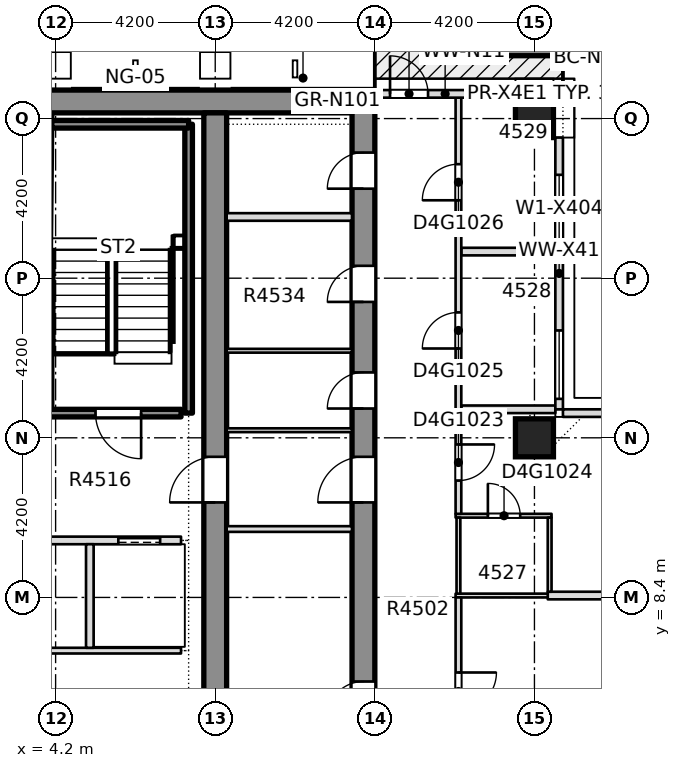
"""IFC4 building model, lengths in metres.
Left out: names, types, materials, properties, quantities, classifications, styles, units other than length and angle.
Written with IfcOpenShell. Run it as: python <this file> out.ifc"""

import sys

from ifc_helpers import new_model, si_unit, direction, frame, frame_2d, origin, origin_2d, place, context, subcontext, project, spatial, rectangle, extrude, element, fill, save


model = new_model("IFC4")
c1 = context("Model", 3, precision=1e-05, world=origin(), true_north=direction((0.0, 1.0)))
c2 = subcontext(c1, "Body", "Model", "MODEL_VIEW")
j1 = project(units=[si_unit("LENGTHUNIT", "METRE"), si_unit("PLANEANGLEUNIT", "RADIAN")], contexts=[c1])
p1 = place(None, origin())
s1 = spatial("IfcSite", under=j1, at=p1, CompositionType="ELEMENT")
p2 = place(p1, origin())
s2 = spatial("IfcBuilding", under=s1, at=p2, CompositionType="ELEMENT")
p3 = place(p2, frame((0.0, 0.0, 175.55)))
s3 = spatial("IfcBuildingStorey", under=s2, at=p3, CompositionType="ELEMENT", Elevation=175.55)
p4 = place(p3, frame((12.3, -8.4, -0.4), z_axis=(0.0, 0.0, 1.0), x_axis=(0.0, 1.0, 0.0)))
e1 = element("IfcWall", 1, at=p4, inside=s3, PredefinedType="SHEAR", context=c2, shape_type="SweptSolid", body=[
    extrude(rectangle(XDim=30.15, YDim=0.6, at=frame_2d((15.075, 0.0))), origin(), (0.0, 0.0, 1.0), 3.45),
])
p5 = place(p4, frame((4.788, 0.0, 0.4)))
e2 = element("IfcOpeningElement", 2, at=p5, cuts=e1, PredefinedType="OPENING", context=c2, shape_type="SweptSolid", body=[
    extrude(rectangle(XDim=0.95, YDim=2.1, at=frame_2d((0.475, 1.05))), frame((0.0, 0.31, 0.0), z_axis=(0.0, -1.0, 0.0), x_axis=(1.0, 0.0, 0.0)), (0.0, 0.0, 1.0), 0.62),
])
p6 = place(p4, frame((13.638, 0.0, 0.4)))
e3 = element("IfcOpeningElement", 3, at=p6, cuts=e1, PredefinedType="OPENING", context=c2, shape_type="SweptSolid", body=[
    extrude(rectangle(XDim=0.95, YDim=2.1, at=frame_2d((0.475, 1.05))), frame((0.0, 0.31, 0.0), z_axis=(0.0, -1.0, 0.0), x_axis=(1.0, 0.0, 0.0)), (0.0, 0.0, 1.0), 0.62),
])
p7 = place(p4, frame((21.771, 0.0, 0.4)))
e4 = element("IfcOpeningElement", 4, at=p7, cuts=e1, PredefinedType="OPENING", context=c2, shape_type="SweptSolid", body=[
    extrude(rectangle(XDim=0.95, YDim=2.1, at=frame_2d((0.475, 1.05))), frame((0.0, 0.31, 0.0), z_axis=(0.0, -1.0, 0.0), x_axis=(1.0, 0.0, 0.0)), (0.0, 0.0, 1.0), 0.62),
])
p8 = place(p4, frame((24.576, 0.0, 0.4)))
e5 = element("IfcOpeningElement", 5, at=p8, cuts=e1, PredefinedType="OPENING", context=c2, shape_type="SweptSolid", body=[
    extrude(rectangle(XDim=0.95, YDim=2.1, at=frame_2d((0.475, 1.05))), frame((0.0, 0.31, 0.0), z_axis=(0.0, -1.0, 0.0), x_axis=(1.0, 0.0, 0.0)), (0.0, 0.0, 1.0), 0.62),
])
p9 = place(p4, frame((27.555, 0.0, 0.4)))
e6 = element("IfcOpeningElement", 6, at=p9, cuts=e1, PredefinedType="OPENING", context=c2, shape_type="SweptSolid", body=[
    extrude(rectangle(XDim=0.95, YDim=2.1, at=frame_2d((0.475, 1.05))), frame((0.0, 0.31, 0.0), z_axis=(0.0, -1.0, 0.0), x_axis=(1.0, 0.0, 0.0)), (0.0, 0.0, 1.0), 0.62),
])
p10 = place(p4, frame((19.3, 0.0, 0.4)))
e7 = element("IfcOpeningElement", 7, at=p10, cuts=e1, PredefinedType="OPENING", context=c2, shape_type="SweptSolid", body=[
    extrude(rectangle(XDim=1.2, YDim=2.1, at=frame_2d((0.6, 1.05))), frame((0.0, 0.31, 0.0), z_axis=(0.0, -1.0, 0.0), x_axis=(1.0, 0.0, 0.0)), (0.0, 0.0, 1.0), 0.62),
])
p11 = place(p3, frame((-12.0, 21.45, -0.4), z_axis=(0.0, 0.0, 1.0), x_axis=(1.0, 0.0, 0.0)))
e8 = element("IfcWall", 8, at=p11, inside=s3, PredefinedType="SHEAR", context=c2, shape_type="SweptSolid", body=[
    extrude(rectangle(XDim=24.0, YDim=0.6, at=frame_2d((12.0, 0.0))), origin(), (0.0, 0.0, 1.0), 3.45),
])
p12 = place(p3, frame((8.4, -7.8, -0.4), z_axis=(0.0, 0.0, 1.0), x_axis=(0.0, 1.0, 0.0)))
e9 = element("IfcWall", 9, at=p12, inside=s3, PredefinedType="SHEAR", context=c2, shape_type="SweptSolid", body=[
    extrude(rectangle(XDim=28.95, YDim=0.6, at=frame_2d((14.475, 0.0))), origin(), (0.0, 0.0, 1.0), 3.45),
])
p13 = place(p12, frame((18.7, 0.0, 0.4)))
e10 = element("IfcOpeningElement", 10, at=p13, cuts=e9, PredefinedType="OPENING", context=c2, shape_type="SweptSolid", body=[
    extrude(rectangle(XDim=1.2, YDim=2.1, at=frame_2d((0.6, 1.05))), frame((0.0, 0.31, 0.0), z_axis=(0.0, -1.0, 0.0), x_axis=(1.0, 0.0, 0.0)), (0.0, 0.0, 1.0), 0.62),
])
for number, where, z_axis, x_axis in (
    (11, (16.8, 12.6, -0.4), (0.0, 0.0, 1.0), (1.0, 0.0, 0.0)),
    (12, (16.8, 21.0, -0.4), (0.0, 0.0, 1.0), (1.0, 0.0, 0.0)),
):
    element("IfcColumn", number, at=place(p3, frame(where, z_axis=z_axis, x_axis=x_axis)), inside=s3, PredefinedType="COLUMN", context=c2, shape_type="SweptSolid", body=[
        extrude(rectangle(XDim=1.0, YDim=1.0, at=origin_2d()), origin(), (0.0, 0.0, 1.0), 3.45),
    ])
p14 = place(p3, frame((14.725, 8.45, 0.0), z_axis=(0.0, 0.0, 1.0), x_axis=(1.0, 0.0, 0.0)))
e13 = element("IfcWall", 13, at=p14, inside=s3, PredefinedType="PARTITIONING", context=c2, shape_type="SweptSolid", body=[
    extrude(rectangle(XDim=2.525, YDim=0.1, at=frame_2d((1.262, 0.0))), origin(), (0.0, 0.0, 1.0), 3.05),
])
p15 = place(p3, frame((17.15, 8.45, 0.0), z_axis=(0.0, 0.0, 1.0), x_axis=(1.0, 0.0, 0.0)))
e14 = element("IfcWall", 14, at=p15, inside=s3, PredefinedType="PARTITIONING", context=c2, shape_type="SweptSolid", body=[
    extrude(rectangle(XDim=8.6, YDim=0.2, at=frame_2d((4.3, 0.0))), origin(), (0.0, 0.0, 1.0), 3.05),
])
p16 = place(p3, frame((14.725, 10.55, 0.0), z_axis=(0.0, 0.0, 1.0), x_axis=(1.0, 0.0, 0.0)))
e15 = element("IfcWall", 15, at=p16, inside=s3, PredefinedType="PARTITIONING", context=c2, shape_type="SweptSolid", body=[
    extrude(rectangle(XDim=2.525, YDim=0.1, at=frame_2d((1.262, 0.0))), origin(), (0.0, 0.0, 1.0), 3.05),
])
p17 = place(p16, frame((0.85, 0.0, 0.0)))
e16 = element("IfcOpeningElement", 16, at=p17, cuts=e15, PredefinedType="OPENING", context=c2, shape_type="SweptSolid", body=[
    extrude(rectangle(XDim=0.85, YDim=2.1, at=frame_2d((0.425, 1.05))), frame((0.0, 0.06, 0.0), z_axis=(0.0, -1.0, 0.0), x_axis=(1.0, 0.0, 0.0)), (0.0, 0.0, 1.0), 0.12),
])
for number, where, z_axis, x_axis in (
    (17, (14.875, 13.35, 0.0), (0.0, 0.0, 1.0), (1.0, 0.0, 0.0)),
    (18, (14.875, 17.5, 0.0), (0.0, 0.0, 1.0), (1.0, 0.0, 0.0)),
):
    element("IfcWall", number, at=place(p3, frame(where, z_axis=z_axis, x_axis=x_axis)), inside=s3, PredefinedType="PARTITIONING", context=c2, shape_type="SweptSolid", body=[
        extrude(rectangle(XDim=2.475, YDim=0.2, at=frame_2d((1.238, 0.0))), origin(), (0.0, 0.0, 1.0), 3.05),
    ])
p18 = place(p3, frame((14.8, -10.525, 0.0), z_axis=(0.0, 0.0, 1.0), x_axis=(0.0, 1.0, 0.0)))
e19 = element("IfcWall", 19, at=p18, inside=s3, PredefinedType="PARTITIONING", context=c2, shape_type="SweptSolid", body=[
    extrude(rectangle(XDim=18.925, YDim=0.15, at=frame_2d((9.462, 0.0))), origin(), (0.0, 0.0, 1.0), 3.05),
])
p19 = place(p18, frame((0.925, 0.0, 0.0)))
e20 = element("IfcOpeningElement", 20, at=p19, cuts=e19, PredefinedType="OPENING", context=c2, shape_type="SweptSolid", body=[
    extrude(rectangle(XDim=1.0, YDim=2.1, at=frame_2d((0.5, 1.05))), frame((0.0, 0.085, 0.0), z_axis=(0.0, -1.0, 0.0), x_axis=(1.0, 0.0, 0.0)), (0.0, 0.0, 1.0), 0.17),
])
p20 = place(p18, frame((15.95, 0.0, 0.0)))
e21 = element("IfcOpeningElement", 21, at=p20, cuts=e19, PredefinedType="OPENING", context=c2, shape_type="SweptSolid", body=[
    extrude(rectangle(XDim=1.0, YDim=2.1, at=frame_2d((0.5, 1.05))), frame((0.0, 0.085, 0.0), z_axis=(0.0, -1.0, 0.0), x_axis=(1.0, 0.0, 0.0)), (0.0, 0.0, 1.0), 0.17),
])
p21 = place(p18, frame((9.975, 0.0, 0.0)))
e22 = element("IfcOpeningElement", 22, at=p21, cuts=e19, PredefinedType="OPENING", context=c2, shape_type="SweptSolid", body=[
    extrude(rectangle(XDim=1.1, YDim=2.1, at=frame_2d((0.55, 1.05))), frame((0.0, 0.085, 0.0), z_axis=(0.0, -1.0, 0.0), x_axis=(1.0, 0.0, 0.0)), (0.0, 0.0, 1.0), 0.17),
])
p22 = place(p18, frame((4.825, 0.0, 0.0)))
e23 = element("IfcOpeningElement", 23, at=p22, cuts=e19, PredefinedType="OPENING", context=c2, shape_type="SweptSolid", body=[
    extrude(rectangle(XDim=1.0, YDim=2.1, at=frame_2d((0.5, 1.05))), frame((0.0, 0.085, 0.0), z_axis=(0.0, -1.0, 0.0), x_axis=(1.0, 0.0, 0.0)), (0.0, 0.0, 1.0), 0.17),
])
p23 = place(p3, frame((14.8, 8.5, 0.0), z_axis=(0.0, 0.0, 1.0), x_axis=(0.0, 1.0, 0.0)))
e24 = element("IfcWall", 24, at=p23, inside=s3, PredefinedType="PARTITIONING", context=c2, shape_type="SweptSolid", body=[
    extrude(rectangle(XDim=2.0, YDim=0.1, at=frame_2d((1.0, 0.0))), origin(), (0.0, 0.0, 1.0), 3.05),
])
p24 = place(p3, frame((14.8, 10.6, 0.0), z_axis=(0.0, 0.0, 1.0), x_axis=(0.0, 1.0, 0.0)))
e25 = element("IfcWall", 25, at=p24, inside=s3, PredefinedType="PARTITIONING", context=c2, shape_type="SweptSolid", body=[
    extrude(rectangle(XDim=10.95, YDim=0.15, at=frame_2d((5.475, 0.0))), origin(), (0.0, 0.0, 1.0), 3.05),
])
p25 = place(p24, frame((0.875, 0.0, 0.0)))
e26 = element("IfcOpeningElement", 26, at=p25, cuts=e25, PredefinedType="OPENING", context=c2, shape_type="SweptSolid", body=[
    extrude(rectangle(XDim=0.95, YDim=2.1, at=frame_2d((0.475, 1.05))), frame((0.0, 0.085, 0.0), z_axis=(0.0, -1.0, 0.0), x_axis=(1.0, 0.0, 0.0)), (0.0, 0.0, 1.0), 0.17),
])
p26 = place(p24, frame((4.35, 0.0, 0.0)))
e27 = element("IfcOpeningElement", 27, at=p26, cuts=e25, PredefinedType="OPENING", context=c2, shape_type="SweptSolid", body=[
    extrude(rectangle(XDim=0.95, YDim=2.1, at=frame_2d((0.475, 1.05))), frame((0.0, 0.085, 0.0), z_axis=(0.0, -1.0, 0.0), x_axis=(1.0, 0.0, 0.0)), (0.0, 0.0, 1.0), 0.17),
])
p27 = place(p24, frame((8.25, 0.0, 0.0)))
e28 = element("IfcOpeningElement", 28, at=p27, cuts=e25, PredefinedType="OPENING", context=c2, shape_type="SweptSolid", body=[
    extrude(rectangle(XDim=0.95, YDim=2.1, at=frame_2d((0.475, 1.05))), frame((0.0, 0.085, 0.0), z_axis=(0.0, -1.0, 0.0), x_axis=(1.0, 0.0, 0.0)), (0.0, 0.0, 1.0), 0.17),
])
p28 = place(p3, frame((17.2, 8.55, 0.0), z_axis=(0.0, 0.0, 1.0), x_axis=(0.0, 1.0, 0.0)))
e29 = element("IfcWall", 29, at=p28, inside=s3, PredefinedType="PARTITIONING", context=c2, shape_type="SweptSolid", body=[
    extrude(rectangle(XDim=1.95, YDim=0.1, at=frame_2d((0.975, 0.0))), origin(), (0.0, 0.0, 1.0), 3.05),
])
p29 = place(p3, frame((24.7, 13.25, 0.0), z_axis=(0.0, 0.0, 1.0), x_axis=(-1.0, 0.0, 0.0)))
e30 = element("IfcWall", 30, at=p29, inside=s3, PredefinedType="STANDARD", context=c2, shape_type="SweptSolid", body=[
    extrude(rectangle(XDim=7.15, YDim=0.2, at=frame_2d((3.575, 0.0))), origin(), (0.0, 0.0, 1.0), 3.05),
])
p30 = place(p3, frame((17.45, 13.35, 0.0), z_axis=(0.0, 0.0, 1.0), x_axis=(0.0, 1.0, 0.0)))
e31 = element("IfcWall", 31, at=p30, inside=s3, PredefinedType="STANDARD", context=c2, shape_type="SweptSolid", body=[
    extrude(rectangle(XDim=7.15, YDim=0.2, at=frame_2d((3.575, 0.0))), origin(), (0.0, 0.0, 1.0), 3.05),
])
p31 = place(p30, frame((0.275, 0.0, 0.2)))
e32 = element("IfcOpeningElement", 32, at=p31, cuts=e31, PredefinedType="OPENING", context=c2, shape_type="SweptSolid", body=[
    extrude(rectangle(XDim=1.8, YDim=2.65, at=frame_2d((0.9, 1.325))), frame((0.0, 0.11, 0.0), z_axis=(0.0, -1.0, 0.0), x_axis=(1.0, 0.0, 0.0)), (0.0, 0.0, 1.0), 0.22),
])
p32 = place(p30, frame((4.37, 0.0, 0.2)))
e33 = element("IfcOpeningElement", 33, at=p32, cuts=e31, PredefinedType="OPENING", context=c2, shape_type="SweptSolid", body=[
    extrude(rectangle(XDim=1.8, YDim=2.65, at=frame_2d((0.9, 1.325))), frame((0.0, 0.11, 0.0), z_axis=(0.0, -1.0, 0.0), x_axis=(1.0, 0.0, 0.0)), (0.0, 0.0, 1.0), 0.22),
])
p33 = place(p3, frame((16.3, 21.65, 0.0), z_axis=(0.0, 0.0, 1.0), x_axis=(-1.0, 0.0, 0.0)))
e34 = element("IfcWall", 34, at=p33, inside=s3, PredefinedType="STANDARD", context=c2, shape_type="SweptSolid", body=[
    extrude(rectangle(XDim=3.7, YDim=0.2, at=frame_2d((1.85, 0.0))), origin(), (0.0, 0.0, 1.0), 3.05),
])
p34 = place(p33, frame((2.3, 0.0, 0.0)))
e35 = element("IfcOpeningElement", 35, at=p34, cuts=e34, PredefinedType="OPENING", context=c2, shape_type="SweptSolid", body=[
    extrude(rectangle(XDim=1.0, YDim=2.4, at=frame_2d((0.5, 1.2))), frame((0.0, 0.11, 0.0), z_axis=(0.0, -1.0, 0.0), x_axis=(1.0, 0.0, 0.0)), (0.0, 0.0, 1.0), 0.22),
])
p35 = place(p3, frame((17.49, 22.954, -0.04), z_axis=(0.0, 0.0, 1.0), x_axis=(-1.0, 0.0, 0.0)))
e36 = element("IfcWall", 36, at=p35, inside=s3, PredefinedType="USERDEFINED", context=c2, shape_type="SweptSolid", body=[
    extrude(rectangle(XDim=2.89, YDim=0.6, at=frame_2d((1.445, 0.0))), origin(), (0.0, 0.0, 1.0), 1.2),
])
p36 = place(p3, frame((-7.5, 7.0, 0.0), z_axis=(0.0, 0.0, 1.0), x_axis=(1.0, 0.0, 0.0)))
e37 = element("IfcWall", 37, at=p36, inside=s3, PredefinedType="PARTITIONING", context=c2, shape_type="SweptSolid", body=[
    extrude(rectangle(XDim=15.0, YDim=0.15, at=frame_2d((7.5, 0.0))), origin(), (0.0, 0.0, 1.0), 3.05),
])
p37 = place(p36, frame((6.8, 0.0, 0.0)))
e38 = element("IfcOpeningElement", 38, at=p37, cuts=e37, PredefinedType="OPENING", context=c2, shape_type="SweptSolid", body=[
    extrude(rectangle(XDim=1.4, YDim=2.1, at=frame_2d((0.7, 1.05))), frame((0.0, 0.085, 0.0), z_axis=(0.0, -1.0, 0.0), x_axis=(1.0, 0.0, 0.0)), (0.0, 0.0, 1.0), 0.17),
])
p38 = place(p3, frame((3.6, 9.9, 0.0), z_axis=(0.0, 0.0, 1.0), x_axis=(1.0, 0.0, 0.0)))
e39 = element("IfcWall", 39, at=p38, inside=s3, PredefinedType="PARTITIONING", context=c2, shape_type="SweptSolid", body=[
    extrude(rectangle(XDim=3.9, YDim=0.2, at=frame_2d((1.95, 0.0))), origin(), (0.0, 0.0, 1.0), 3.05),
])
p39 = place(p38, frame((2.25, 0.0, 0.0)))
e40 = element("IfcOpeningElement", 40, at=p39, cuts=e39, PredefinedType="OPENING", context=c2, shape_type="SweptSolid", body=[
    extrude(rectangle(XDim=1.1, YDim=2.1, at=frame_2d((0.55, 1.05))), frame((0.0, 0.11, 0.0), z_axis=(0.0, -1.0, 0.0), x_axis=(1.0, 0.0, 0.0)), (0.0, 0.0, 1.0), 0.22),
])
p40 = place(p3, frame((3.425, 13.25, 0.0), z_axis=(0.0, 0.0, 1.0), x_axis=(1.0, 0.0, 0.0)))
e41 = element("IfcWall", 41, at=p40, inside=s3, PredefinedType="SOLIDWALL", context=c2, shape_type="SweptSolid", body=[
    extrude(rectangle(XDim=4.075, YDim=0.2, at=frame_2d((2.038, 0.0))), origin(), (0.0, 0.0, 1.0), 3.05),
])
p41 = place(p40, frame((1.825, 0.0, 0.0)))
e42 = element("IfcOpeningElement", 42, at=p41, cuts=e41, PredefinedType="OPENING", context=c2, shape_type="SweptSolid", body=[
    extrude(rectangle(XDim=1.2, YDim=2.1, at=frame_2d((0.6, 1.05))), frame((0.0, 0.11, 0.0), z_axis=(0.0, -1.0, 0.0), x_axis=(1.0, 0.0, 0.0)), (0.0, 0.0, 1.0), 0.22),
])
p42 = place(p3, frame((5.1, 7.075, 0.0), z_axis=(0.0, 0.0, 1.0), x_axis=(0.0, 1.0, 0.0)))
e43 = element("IfcWall", 43, at=p42, inside=s3, PredefinedType="PARTITIONING", context=c2, shape_type="SweptSolid", body=[
    extrude(rectangle(XDim=2.725, YDim=0.2, at=frame_2d((1.363, 0.0))), origin(), (0.0, 0.0, 1.0), 3.05),
])
p43 = place(p3, frame((8.701, 10.2, 0.0), z_axis=(0.0, 0.0, 1.0), x_axis=(1.0, 0.0, 0.0)))
e44 = element("IfcWall", 44, at=p43, inside=s3, PredefinedType="PARTITIONING", context=c2, shape_type="SweptSolid", body=[
    extrude(rectangle(XDim=3.298, YDim=0.15, at=frame_2d((1.649, 0.0))), origin(), (0.0, 0.0, 1.0), 3.05),
])
for number, where, z_axis, x_axis in (
    (45, (8.701, 12.8, 0.0), (0.0, 0.0, 1.0), (1.0, 0.0, 0.0)),
    (46, (8.701, 14.891, 0.0), (0.0, 0.0, 1.0), (1.0, 0.0, 0.0)),
):
    element("IfcWall", number, at=place(p3, frame(where, z_axis=z_axis, x_axis=x_axis)), inside=s3, PredefinedType="PARTITIONING", context=c2, shape_type="SweptSolid", body=[
        extrude(rectangle(XDim=3.298, YDim=0.1, at=frame_2d((1.649, 0.0))), origin(), (0.0, 0.0, 1.0), 3.05),
    ])
p44 = place(p3, frame((8.701, 18.411, 0.0), z_axis=(0.0, 0.0, 1.0), x_axis=(1.0, 0.0, 0.0)))
e47 = element("IfcWall", 47, at=p44, inside=s3, PredefinedType="PARTITIONING", context=c2, shape_type="SweptSolid", body=[
    extrude(rectangle(XDim=3.298, YDim=0.2, at=frame_2d((1.649, 0.0))), origin(), (0.0, 0.0, 1.0), 3.05),
])
p45 = place(p3, frame((7.7, 13.25, 0.0), z_axis=(0.0, 0.0, 1.0), x_axis=(0.0, 1.0, 0.0)))
e48 = element("IfcWall", 48, at=p45, inside=s3, PredefinedType="SOLIDWALL", context=c2, shape_type="SweptSolid", body=[
    extrude(rectangle(XDim=7.6, YDim=0.2, at=frame_2d((3.8, 0.0))), origin(), (0.0, 0.0, 1.0), 3.05),
])
p46 = place(p3, frame((4.1, 20.85, 0.0), z_axis=(0.0, 0.0, 1.0), x_axis=(1.0, 0.0, 0.0)))
e49 = element("IfcWall", 49, at=p46, inside=s3, PredefinedType="SOLIDWALL", context=c2, shape_type="SweptSolid", body=[
    extrude(rectangle(XDim=3.6, YDim=0.2, at=frame_2d((1.8, 0.0))), origin(), (0.0, 0.0, 1.0), 3.05),
])
p47 = place(p20, origin())
e50 = element("IfcDoor", 50, at=p47, inside=s3, OperationType="SINGLE_SWING_LEFT", PredefinedType="DOOR", context=c2, shape_type="SweptSolid", body=[
    extrude(rectangle(XDim=1.0, YDim=2.1, at=frame_2d((0.5, 1.05))), frame((0.0, 0.025, 0.0), z_axis=(0.0, -1.0, 0.0), x_axis=(1.0, 0.0, 0.0)), (0.0, 0.0, 1.0), 0.05),
])
fill(e21, e50)
p48 = place(p25, origin())
e51 = element("IfcDoor", 51, at=p48, inside=s3, OperationType="SINGLE_SWING_RIGHT", PredefinedType="DOOR", context=c2, shape_type="SweptSolid", body=[
    extrude(rectangle(XDim=0.95, YDim=2.1, at=frame_2d((0.475, 1.05))), frame((0.0, 0.025, 0.0), z_axis=(0.0, -1.0, 0.0), x_axis=(1.0, 0.0, 0.0)), (0.0, 0.0, 1.0), 0.05),
])
fill(e26, e51)
p49 = place(p17, origin())
e52 = element("IfcDoor", 52, at=p49, inside=s3, OperationType="SINGLE_SWING_RIGHT", PredefinedType="DOOR", context=c2, shape_type="SweptSolid", body=[
    extrude(rectangle(XDim=0.85, YDim=2.1, at=frame_2d((0.425, 1.05))), frame((0.0, 0.025, 0.0), z_axis=(0.0, -1.0, 0.0), x_axis=(1.0, 0.0, 0.0)), (0.0, 0.0, 1.0), 0.05),
])
fill(e16, e52)
p50 = place(p26, origin())
e53 = element("IfcDoor", 53, at=p50, inside=s3, OperationType="SINGLE_SWING_RIGHT", PredefinedType="DOOR", context=c2, shape_type="SweptSolid", body=[
    extrude(rectangle(XDim=0.95, YDim=2.1, at=frame_2d((0.475, 1.05))), frame((0.0, 0.025, 0.0), z_axis=(0.0, -1.0, 0.0), x_axis=(1.0, 0.0, 0.0)), (0.0, 0.0, 1.0), 0.05),
])
fill(e27, e53)
p51 = place(p27, origin())
e54 = element("IfcDoor", 54, at=p51, inside=s3, OperationType="SINGLE_SWING_LEFT", PredefinedType="DOOR", context=c2, shape_type="SweptSolid", body=[
    extrude(rectangle(XDim=0.95, YDim=2.1, at=frame_2d((0.475, 1.05))), frame((0.0, 0.025, 0.0), z_axis=(0.0, -1.0, 0.0), x_axis=(1.0, 0.0, 0.0)), (0.0, 0.0, 1.0), 0.05),
])
fill(e28, e54)
p52 = place(p31, origin())
e55 = element("IfcWindow", 55, at=p52, inside=s3, PartitioningType="SINGLE_PANEL", PredefinedType="WINDOW", context=c2, shape_type="SweptSolid", body=[
    extrude(rectangle(XDim=1.8, YDim=2.65, at=frame_2d((0.9, 1.325))), frame((0.0, 0.03, 0.0), z_axis=(0.0, -1.0, 0.0), x_axis=(1.0, 0.0, 0.0)), (0.0, 0.0, 1.0), 0.06),
])
fill(e32, e55)
p53 = place(p32, origin())
e56 = element("IfcWindow", 56, at=p53, inside=s3, PartitioningType="SINGLE_PANEL", PredefinedType="WINDOW", context=c2, shape_type="SweptSolid", body=[
    extrude(rectangle(XDim=1.8, YDim=2.65, at=frame_2d((0.9, 1.325))), frame((0.0, 0.03, 0.0), z_axis=(0.0, -1.0, 0.0), x_axis=(1.0, 0.0, 0.0)), (0.0, 0.0, 1.0), 0.06),
])
fill(e33, e56)
p54 = place(p34, origin())
e57 = element("IfcDoor", 57, at=p54, inside=s3, OperationType="SINGLE_SWING_LEFT", PredefinedType="DOOR", context=c2, shape_type="SweptSolid", body=[
    extrude(rectangle(XDim=1.0, YDim=2.4, at=frame_2d((0.5, 1.2))), frame((0.0, 0.025, 0.0), z_axis=(0.0, -1.0, 0.0), x_axis=(1.0, 0.0, 0.0)), (0.0, 0.0, 1.0), 0.05),
])
fill(e35, e57)
p55 = place(p41, origin())
e58 = element("IfcDoor", 58, at=p55, inside=s3, OperationType="SINGLE_SWING_RIGHT", PredefinedType="DOOR", context=c2, shape_type="SweptSolid", body=[
    extrude(rectangle(XDim=1.2, YDim=2.1, at=frame_2d((0.6, 1.05))), frame((0.0, 0.025, 0.0), z_axis=(0.0, -1.0, 0.0), x_axis=(1.0, 0.0, 0.0)), (0.0, 0.0, 1.0), 0.05),
])
fill(e42, e58)
p56 = place(p39, origin())
e59 = element("IfcDoor", 59, at=p56, inside=s3, OperationType="SLIDING_TO_LEFT", PredefinedType="DOOR", context=c2, shape_type="SweptSolid", body=[
    extrude(rectangle(XDim=1.1, YDim=2.1, at=frame_2d((0.55, 1.05))), frame((0.0, 0.025, 0.0), z_axis=(0.0, -1.0, 0.0), x_axis=(1.0, 0.0, 0.0)), (0.0, 0.0, 1.0), 0.05),
])
fill(e40, e59)
p57 = place(p6, origin())
e60 = element("IfcDoor", 60, at=p57, inside=s3, OperationType="SINGLE_SWING_LEFT", PredefinedType="DOOR", context=c2, shape_type="SweptSolid", body=[
    extrude(rectangle(XDim=0.95, YDim=2.1, at=frame_2d((0.475, 1.05))), frame((0.0, 0.025, 0.0), z_axis=(0.0, -1.0, 0.0), x_axis=(1.0, 0.0, 0.0)), (0.0, 0.0, 1.0), 0.05),
])
fill(e3, e60)
p58 = place(p7, origin())
e61 = element("IfcDoor", 61, at=p58, inside=s3, OperationType="SINGLE_SWING_LEFT", PredefinedType="DOOR", context=c2, shape_type="SweptSolid", body=[
    extrude(rectangle(XDim=0.95, YDim=2.1, at=frame_2d((0.475, 1.05))), frame((0.0, 0.025, 0.0), z_axis=(0.0, -1.0, 0.0), x_axis=(1.0, 0.0, 0.0)), (0.0, 0.0, 1.0), 0.05),
])
fill(e4, e61)
p59 = place(p8, origin())
e62 = element("IfcDoor", 62, at=p59, inside=s3, OperationType="SINGLE_SWING_LEFT", PredefinedType="DOOR", context=c2, shape_type="SweptSolid", body=[
    extrude(rectangle(XDim=0.95, YDim=2.1, at=frame_2d((0.475, 1.05))), frame((0.0, 0.025, 0.0), z_axis=(0.0, -1.0, 0.0), x_axis=(1.0, 0.0, 0.0)), (0.0, 0.0, 1.0), 0.05),
])
fill(e5, e62)
p60 = place(p9, origin())
e63 = element("IfcDoor", 63, at=p60, inside=s3, OperationType="SINGLE_SWING_LEFT", PredefinedType="DOOR", context=c2, shape_type="SweptSolid", body=[
    extrude(rectangle(XDim=0.95, YDim=2.1, at=frame_2d((0.475, 1.05))), frame((0.0, 0.025, 0.0), z_axis=(0.0, -1.0, 0.0), x_axis=(1.0, 0.0, 0.0)), (0.0, 0.0, 1.0), 0.05),
])
fill(e6, e63)
p61 = place(p10, origin())
e64 = element("IfcDoor", 64, at=p61, inside=s3, OperationType="SINGLE_SWING_LEFT", PredefinedType="DOOR", context=c2, shape_type="SweptSolid", body=[
    extrude(rectangle(XDim=1.2, YDim=2.1, at=frame_2d((0.6, 1.05))), frame((0.0, 0.025, 0.0), z_axis=(0.0, -1.0, 0.0), x_axis=(1.0, 0.0, 0.0)), (0.0, 0.0, 1.0), 0.05),
])
fill(e7, e64)
p62 = place(p13, origin())
e65 = element("IfcDoor", 65, at=p62, inside=s3, OperationType="SINGLE_SWING_LEFT", PredefinedType="DOOR", context=c2, shape_type="SweptSolid", body=[
    extrude(rectangle(XDim=1.2, YDim=2.1, at=frame_2d((0.6, 1.05))), frame((0.0, 0.025, 0.0), z_axis=(0.0, -1.0, 0.0), x_axis=(1.0, 0.0, 0.0)), (0.0, 0.0, 1.0), 0.05),
])
fill(e10, e65)
save(model, sys.argv[1])
